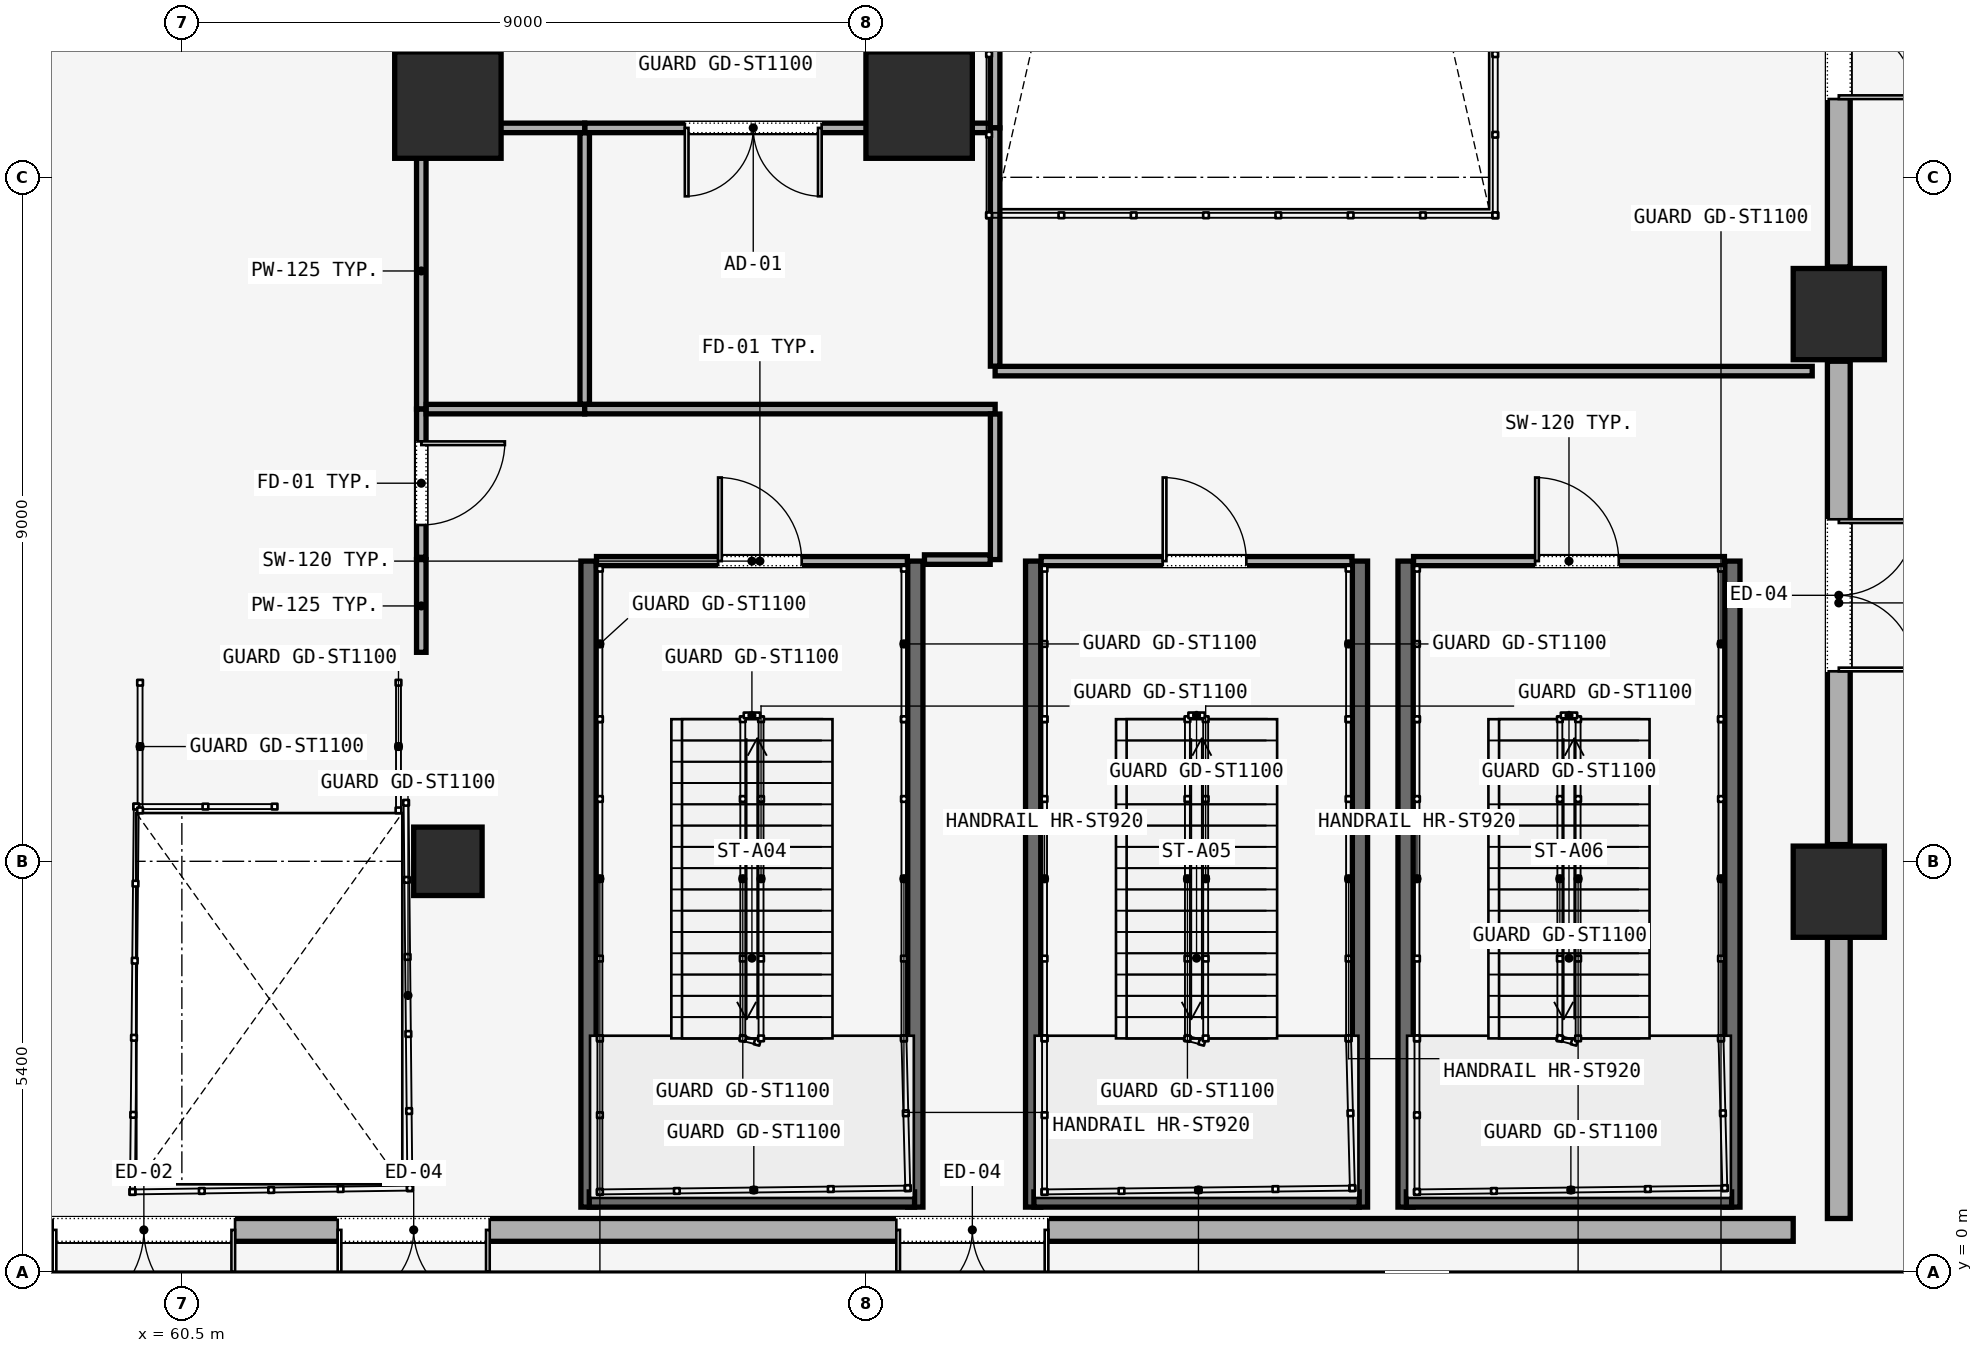
"""IFC4 building model, lengths in metres.
Left out: names, types, materials, properties, quantities, classifications, styles, units other than length and angle.
Written with IfcOpenShell. Run it as: python <this file> out.ifc"""

import sys

from ifc_helpers import new_model, si_unit, direction, frame, frame_2d, origin, origin_2d, place, context, subcontext, project, spatial, rectangle, extrude, element, fill, save


model = new_model("IFC4")
c1 = context("Model", 3, precision=1e-05, world=origin(), true_north=direction((0.0, 1.0)))
c2 = subcontext(c1, "Body", "Model", "MODEL_VIEW")
j1 = project(units=[si_unit("LENGTHUNIT", "METRE"), si_unit("PLANEANGLEUNIT", "RADIAN")], contexts=[c1])
p1 = place(None, origin())
s1 = spatial("IfcSite", under=j1, at=p1, CompositionType="ELEMENT")
p2 = place(p1, origin())
s2 = spatial("IfcBuilding", under=s1, at=p2, CompositionType="ELEMENT")
p3 = place(p2, origin())
s3 = spatial("IfcBuildingStorey", under=s2, at=p3, CompositionType="ELEMENT", Elevation=0.0)
for number, where, z_axis, x_axis in (
    (1, (82.3, 5.0, 0.0), (0.0, 0.0, 1.0), (1.0, 0.0, 0.0)),
    (2, (82.3, 12.6, 0.0), (0.0, 0.0, 1.0), (1.0, 0.0, 0.0)),
):
    element("IfcColumn", number, at=place(p3, frame(where, z_axis=z_axis, x_axis=x_axis)), inside=s3, PredefinedType="COLUMN", context=c2, shape_type="SweptSolid", body=[
        extrude(rectangle(XDim=1.2, YDim=1.2, at=origin_2d()), origin(), (0.0, 0.0, 1.0), 5.7),
    ])
for number, where, z_axis, x_axis in (
    (3, (70.2, 15.35, 0.0), (0.0, 0.0, 1.0), (1.0, 0.0, 0.0)),
    (4, (64.0, 15.35, 0.0), (0.0, 0.0, 1.0), (1.0, 0.0, 0.0)),
):
    element("IfcColumn", number, at=place(p3, frame(where, z_axis=z_axis, x_axis=x_axis)), inside=s3, PredefinedType="COLUMN", context=c2, shape_type="SweptSolid", body=[
        extrude(rectangle(XDim=1.4, YDim=1.4, at=origin_2d()), origin(), (0.0, 0.0, 1.0), 5.7),
    ])
p4 = place(p3, frame((64.0, 5.4, 0.0), z_axis=(0.0, 0.0, 1.0), x_axis=(1.0, 0.0, 0.0)))
e5 = element("IfcColumn", 5, at=p4, inside=s3, PredefinedType="COLUMN", context=c2, shape_type="SweptSolid", body=[
    extrude(rectangle(XDim=0.9, YDim=0.9, at=origin_2d()), origin(), (0.0, 0.0, 1.0), 5.7),
])
p5 = place(p3, frame((81.7, 0.55, 0.0), z_axis=(0.0, 0.0, 1.0), x_axis=(-1.0, 0.0, 0.0)))
e6 = element("IfcWall", 6, at=p5, inside=s3, PredefinedType="SOLIDWALL", context=c2, shape_type="SweptSolid", body=[
    extrude(rectangle(XDim=23.75, YDim=0.3, at=frame_2d((11.875, 0.0))), origin(), (0.0, 0.0, 1.0), 5.7),
])
p6 = place(p5, frame((20.5, 0.0, 0.0)))
e7 = element("IfcOpeningElement", 7, at=p6, cuts=e6, PredefinedType="OPENING", context=c2, shape_type="SweptSolid", body=[
    extrude(rectangle(XDim=2.4, YDim=2.5, at=frame_2d((1.2, 1.25))), frame((0.0, 0.15, 0.0), z_axis=(0.0, -1.0, 0.0), x_axis=(1.0, 0.0, 0.0)), (0.0, 0.0, 1.0), 0.3),
])
p7 = place(p5, frame((17.15, 0.0, 0.0)))
e8 = element("IfcOpeningElement", 8, at=p7, cuts=e6, PredefinedType="OPENING", context=c2, shape_type="SweptSolid", body=[
    extrude(rectangle(XDim=2.0, YDim=2.3, at=frame_2d((1.0, 1.15))), frame((0.0, 0.15, 0.0), z_axis=(0.0, -1.0, 0.0), x_axis=(1.0, 0.0, 0.0)), (0.0, 0.0, 1.0), 0.3),
])
p8 = place(p5, frame((9.8, 0.0, 0.0)))
e9 = element("IfcOpeningElement", 9, at=p8, cuts=e6, PredefinedType="OPENING", context=c2, shape_type="SweptSolid", body=[
    extrude(rectangle(XDim=2.0, YDim=2.3, at=frame_2d((1.0, 1.15))), frame((0.0, 0.15, 0.0), z_axis=(0.0, -1.0, 0.0), x_axis=(1.0, 0.0, 0.0)), (0.0, 0.0, 1.0), 0.3),
])
p9 = place(p3, frame((82.3, 4.4, 0.0), z_axis=(0.0, 0.0, 1.0), x_axis=(0.0, -1.0, 0.0)))
e10 = element("IfcWall", 10, at=p9, inside=s3, PredefinedType="SOLIDWALL", context=c2, shape_type="SweptSolid", body=[
    extrude(rectangle(XDim=3.7, YDim=0.3, at=frame_2d((1.85, 0.0))), origin(), (0.0, 0.0, 1.0), 5.7),
])
p10 = place(p3, frame((82.3, 11.98, 0.0), z_axis=(0.0, 0.0, 1.0), x_axis=(0.0, -1.0, 0.0)))
e11 = element("IfcWall", 11, at=p10, inside=s3, PredefinedType="SOLIDWALL", context=c2, shape_type="SweptSolid", body=[
    extrude(rectangle(XDim=6.36, YDim=0.3, at=frame_2d((3.18, 0.0))), origin(), (0.0, 0.0, 1.0), 5.7),
])
p11 = place(p10, frame((2.08, 0.0, 0.0)))
e12 = element("IfcOpeningElement", 12, at=p11, cuts=e11, PredefinedType="OPENING", context=c2, shape_type="SweptSolid", body=[
    extrude(rectangle(XDim=2.0, YDim=2.3, at=frame_2d((1.0, 1.15))), frame((0.0, 0.15, 0.0), z_axis=(0.0, -1.0, 0.0), x_axis=(1.0, 0.0, 0.0)), (0.0, 0.0, 1.0), 0.3),
])
p12 = place(p3, frame((82.3, 19.58, 0.0), z_axis=(0.0, 0.0, 1.0), x_axis=(0.0, -1.0, 0.0)))
e13 = element("IfcWall", 13, at=p12, inside=s3, PredefinedType="SOLIDWALL", context=c2, shape_type="SweptSolid", body=[
    extrude(rectangle(XDim=6.36, YDim=0.3, at=frame_2d((3.18, 0.0))), origin(), (0.0, 0.0, 1.0), 5.7),
])
p13 = place(p12, frame((2.15, 0.0, 0.0)))
e14 = element("IfcOpeningElement", 14, at=p13, cuts=e13, PredefinedType="OPENING", context=c2, shape_type="SweptSolid", body=[
    extrude(rectangle(XDim=2.0, YDim=2.3, at=frame_2d((1.0, 1.15))), frame((0.0, 0.15, 0.0), z_axis=(0.0, -1.0, 0.0), x_axis=(1.0, 0.0, 0.0)), (0.0, 0.0, 1.0), 0.3),
])
for number, where, z_axis, x_axis in (
    (15, (65.85, 9.35, -0.4), (0.0, 0.0, 1.0), (0.0, -1.0, 0.0)),
    (16, (70.15, 9.35, -0.4), (0.0, 0.0, 1.0), (0.0, -1.0, 0.0)),
):
    element("IfcWall", number, at=place(p3, frame(where, z_axis=z_axis, x_axis=x_axis)), inside=s3, PredefinedType="SOLIDWALL", context=c2, shape_type="SweptSolid", body=[
        extrude(rectangle(XDim=8.5, YDim=0.2, at=frame_2d((4.25, 0.0))), origin(), (0.0, 0.0, 1.0), 6.4),
    ])
p14 = place(p3, frame((65.86, 0.95, -0.4), z_axis=(0.0, 0.0, 1.0), x_axis=(1.0, 0.0, 0.0)))
e17 = element("IfcWall", 17, at=p14, inside=s3, PredefinedType="SOLIDWALL", context=c2, shape_type="SweptSolid", body=[
    extrude(rectangle(XDim=4.28, YDim=0.2, at=frame_2d((2.14, 0.0))), origin(), (0.0, 0.0, 1.0), 6.4),
])
p15 = place(p3, frame((65.955, 9.35, 0.0), z_axis=(0.0, 0.0, 1.0), x_axis=(1.0, 0.0, 0.0)))
e18 = element("IfcWall", 18, at=p15, inside=s3, PredefinedType="SOLIDWALL", context=c2, shape_type="SweptSolid", body=[
    extrude(rectangle(XDim=4.09, YDim=0.12, at=frame_2d((2.045, 0.0))), origin(), (0.0, 0.0, 1.0), 3.6),
])
p16 = place(p15, frame((1.6, 0.0, 0.0)))
e19 = element("IfcOpeningElement", 19, at=p16, cuts=e18, PredefinedType="OPENING", context=c2, shape_type="SweptSolid", body=[
    extrude(rectangle(XDim=1.1, YDim=2.2, at=frame_2d((0.55, 1.1))), frame((0.0, 0.06, 0.0), z_axis=(0.0, -1.0, 0.0), x_axis=(1.0, 0.0, 0.0)), (0.0, 0.0, 1.0), 0.12),
])
for number, where, z_axis, x_axis in (
    (20, (71.7, 9.35, -0.4), (0.0, 0.0, 1.0), (0.0, -1.0, 0.0)),
    (21, (76.0, 9.35, -0.4), (0.0, 0.0, 1.0), (0.0, -1.0, 0.0)),
):
    element("IfcWall", number, at=place(p3, frame(where, z_axis=z_axis, x_axis=x_axis)), inside=s3, PredefinedType="SOLIDWALL", context=c2, shape_type="SweptSolid", body=[
        extrude(rectangle(XDim=8.5, YDim=0.2, at=frame_2d((4.25, 0.0))), origin(), (0.0, 0.0, 1.0), 6.4),
    ])
p17 = place(p3, frame((71.71, 0.95, -0.4), z_axis=(0.0, 0.0, 1.0), x_axis=(1.0, 0.0, 0.0)))
e22 = element("IfcWall", 22, at=p17, inside=s3, PredefinedType="SOLIDWALL", context=c2, shape_type="SweptSolid", body=[
    extrude(rectangle(XDim=4.28, YDim=0.2, at=frame_2d((2.14, 0.0))), origin(), (0.0, 0.0, 1.0), 6.4),
])
p18 = place(p3, frame((71.805, 9.35, 0.0), z_axis=(0.0, 0.0, 1.0), x_axis=(1.0, 0.0, 0.0)))
e23 = element("IfcWall", 23, at=p18, inside=s3, PredefinedType="SOLIDWALL", context=c2, shape_type="SweptSolid", body=[
    extrude(rectangle(XDim=4.09, YDim=0.12, at=frame_2d((2.045, 0.0))), origin(), (0.0, 0.0, 1.0), 3.6),
])
p19 = place(p18, frame((1.6, 0.0, 0.0)))
e24 = element("IfcOpeningElement", 24, at=p19, cuts=e23, PredefinedType="OPENING", context=c2, shape_type="SweptSolid", body=[
    extrude(rectangle(XDim=1.1, YDim=2.2, at=frame_2d((0.55, 1.1))), frame((0.0, 0.06, 0.0), z_axis=(0.0, -1.0, 0.0), x_axis=(1.0, 0.0, 0.0)), (0.0, 0.0, 1.0), 0.12),
])
for number, where, z_axis, x_axis in (
    (25, (76.6, 9.35, -0.4), (0.0, 0.0, 1.0), (0.0, -1.0, 0.0)),
    (26, (80.9, 9.35, -0.4), (0.0, 0.0, 1.0), (0.0, -1.0, 0.0)),
):
    element("IfcWall", number, at=place(p3, frame(where, z_axis=z_axis, x_axis=x_axis)), inside=s3, PredefinedType="SOLIDWALL", context=c2, shape_type="SweptSolid", body=[
        extrude(rectangle(XDim=8.5, YDim=0.2, at=frame_2d((4.25, 0.0))), origin(), (0.0, 0.0, 1.0), 6.4),
    ])
p20 = place(p3, frame((76.61, 0.95, -0.4), z_axis=(0.0, 0.0, 1.0), x_axis=(1.0, 0.0, 0.0)))
e27 = element("IfcWall", 27, at=p20, inside=s3, PredefinedType="SOLIDWALL", context=c2, shape_type="SweptSolid", body=[
    extrude(rectangle(XDim=4.28, YDim=0.2, at=frame_2d((2.14, 0.0))), origin(), (0.0, 0.0, 1.0), 6.4),
])
p21 = place(p3, frame((76.705, 9.35, 0.0), z_axis=(0.0, 0.0, 1.0), x_axis=(1.0, 0.0, 0.0)))
e28 = element("IfcWall", 28, at=p21, inside=s3, PredefinedType="SOLIDWALL", context=c2, shape_type="SweptSolid", body=[
    extrude(rectangle(XDim=4.09, YDim=0.12, at=frame_2d((2.045, 0.0))), origin(), (0.0, 0.0, 1.0), 3.6),
])
p22 = place(p21, frame((1.6, 0.0, 0.0)))
e29 = element("IfcOpeningElement", 29, at=p22, cuts=e28, PredefinedType="OPENING", context=c2, shape_type="SweptSolid", body=[
    extrude(rectangle(XDim=1.1, YDim=2.2, at=frame_2d((0.55, 1.1))), frame((0.0, 0.06, 0.0), z_axis=(0.0, -1.0, 0.0), x_axis=(1.0, 0.0, 0.0)), (0.0, 0.0, 1.0), 0.12),
])
p23 = place(p3, frame((71.2, 16.885, 0.0), z_axis=(0.0, 0.0, 1.0), x_axis=(0.0, -1.0, 0.0)))
e30 = element("IfcWall", 30, at=p23, inside=s3, PredefinedType="PARTITIONING", context=c2, shape_type="SweptSolid", body=[
    extrude(rectangle(XDim=1.835, YDim=0.125, at=frame_2d((0.917, 0.0))), origin(), (0.0, 0.0, 1.0), 3.6),
])
p24 = place(p3, frame((71.135, 15.05, 0.0), z_axis=(0.0, 0.0, 1.0), x_axis=(-1.0, 0.0, 0.0)))
e31 = element("IfcWall", 31, at=p24, inside=s3, PredefinedType="PARTITIONING", context=c2, shape_type="SweptSolid", body=[
    extrude(rectangle(XDim=5.335, YDim=0.125, at=frame_2d((2.667, 0.0))), origin(), (0.0, 0.0, 1.0), 3.6),
])
p25 = place(p24, frame((2.218, 0.0, 0.0)))
e32 = element("IfcOpeningElement", 32, at=p25, cuts=e31, PredefinedType="OPENING", context=c2, shape_type="SweptSolid", body=[
    extrude(rectangle(XDim=1.8, YDim=2.3, at=frame_2d((0.9, 1.15))), frame((0.0, 0.062, 0.0), z_axis=(0.0, -1.0, 0.0), x_axis=(1.0, 0.0, 0.0)), (0.0, 0.0, 1.0), 0.125),
])
p26 = place(p3, frame((65.8, 15.05, 0.0), z_axis=(0.0, 0.0, 1.0), x_axis=(-1.0, 0.0, 0.0)))
e33 = element("IfcWall", 33, at=p26, inside=s3, PredefinedType="PARTITIONING", context=c2, shape_type="SweptSolid", body=[
    extrude(rectangle(XDim=2.15, YDim=0.125, at=frame_2d((1.075, 0.0))), origin(), (0.0, 0.0, 1.0), 3.6),
])
p27 = place(p3, frame((63.65, 14.985, 0.0), z_axis=(0.0, 0.0, 1.0), x_axis=(0.0, -1.0, 0.0)))
e34 = element("IfcWall", 34, at=p27, inside=s3, PredefinedType="PARTITIONING", context=c2, shape_type="SweptSolid", body=[
    extrude(rectangle(XDim=3.635, YDim=0.125, at=frame_2d((1.817, 0.0))), origin(), (0.0, 0.0, 1.0), 3.6),
])
p28 = place(p3, frame((63.65, 11.35, 0.0), z_axis=(0.0, 0.0, 1.0), x_axis=(0.0, -1.0, 0.0)))
e35 = element("IfcWall", 35, at=p28, inside=s3, PredefinedType="PARTITIONING", context=c2, shape_type="SweptSolid", body=[
    extrude(rectangle(XDim=1.95, YDim=0.125, at=frame_2d((0.975, 0.0))), origin(), (0.0, 0.0, 1.0), 3.6),
])
p29 = place(p28, frame((0.425, 0.0, 0.0)))
e36 = element("IfcOpeningElement", 36, at=p29, cuts=e35, PredefinedType="OPENING", context=c2, shape_type="SweptSolid", body=[
    extrude(rectangle(XDim=1.1, YDim=2.2, at=frame_2d((0.55, 1.1))), frame((0.0, 0.062, 0.0), z_axis=(0.0, -1.0, 0.0), x_axis=(1.0, 0.0, 0.0)), (0.0, 0.0, 1.0), 0.125),
])
p30 = place(p3, frame((63.65, 9.37, 0.0), z_axis=(0.0, 0.0, 1.0), x_axis=(0.0, -1.0, 0.0)))
e37 = element("IfcWall", 37, at=p30, inside=s3, PredefinedType="PARTITIONING", context=c2, shape_type="SweptSolid", body=[
    extrude(rectangle(XDim=1.22, YDim=0.125, at=frame_2d((0.61, 0.0))), origin(), (0.0, 0.0, 1.0), 3.6),
])
p31 = place(p3, frame((63.715, 11.35, 0.0), z_axis=(0.0, 0.0, 1.0), x_axis=(1.0, 0.0, 0.0)))
e38 = element("IfcWall", 38, at=p31, inside=s3, PredefinedType="PARTITIONING", context=c2, shape_type="SweptSolid", body=[
    extrude(rectangle(XDim=2.085, YDim=0.125, at=frame_2d((1.042, 0.0))), origin(), (0.0, 0.0, 1.0), 3.6),
])
p32 = place(p3, frame((65.8, 11.35, 0.0), z_axis=(0.0, 0.0, 1.0), x_axis=(1.0, 0.0, 0.0)))
e39 = element("IfcWall", 39, at=p32, inside=s3, PredefinedType="PARTITIONING", context=c2, shape_type="SweptSolid", body=[
    extrude(rectangle(XDim=5.4, YDim=0.125, at=frame_2d((2.7, 0.0))), origin(), (0.0, 0.0, 1.0), 3.6),
])
p33 = place(p3, frame((71.2, 11.285, 0.0), z_axis=(0.0, 0.0, 1.0), x_axis=(0.0, -1.0, 0.0)))
e40 = element("IfcWall", 40, at=p33, inside=s3, PredefinedType="PARTITIONING", context=c2, shape_type="SweptSolid", body=[
    extrude(rectangle(XDim=1.915, YDim=0.125, at=frame_2d((0.958, 0.0))), origin(), (0.0, 0.0, 1.0), 3.6),
])
p34 = place(p3, frame((71.135, 9.37, 0.0), z_axis=(0.0, 0.0, 1.0), x_axis=(-1.0, 0.0, 0.0)))
e41 = element("IfcWall", 41, at=p34, inside=s3, PredefinedType="PARTITIONING", context=c2, shape_type="SweptSolid", body=[
    extrude(rectangle(XDim=0.865, YDim=0.125, at=frame_2d((0.433, 0.0))), origin(), (0.0, 0.0, 1.0), 3.6),
])
p35 = place(p3, frame((71.2, 11.85, 0.0), z_axis=(0.0, 0.0, 1.0), x_axis=(1.0, 0.0, 0.0)))
e42 = element("IfcWall", 42, at=p35, inside=s3, PredefinedType="PARTITIONING", context=c2, shape_type="SweptSolid", body=[
    extrude(rectangle(XDim=10.75, YDim=0.125, at=frame_2d((5.375, 0.0))), origin(), (0.0, 0.0, 1.0), 3.6),
])
p36 = place(p3, frame((65.8, 11.415, 0.0), z_axis=(0.0, 0.0, 1.0), x_axis=(0.0, 1.0, 0.0)))
e43 = element("IfcWall", 43, at=p36, inside=s3, PredefinedType="PARTITIONING", context=c2, shape_type="SweptSolid", body=[
    extrude(rectangle(XDim=3.57, YDim=0.125, at=frame_2d((1.785, 0.0))), origin(), (0.0, 0.0, 1.0), 3.6),
])
p37 = place(p3, frame((71.2, 15.05, 0.0), z_axis=(0.0, 0.0, 1.0), x_axis=(0.0, -1.0, 0.0)))
e44 = element("IfcWall", 44, at=p37, inside=s3, PredefinedType="PARTITIONING", context=c2, shape_type="SweptSolid", body=[
    extrude(rectangle(XDim=3.135, YDim=0.125, at=frame_2d((1.567, 0.0))), origin(), (0.0, 0.0, 1.0), 3.6),
])
p38 = place(p6, origin())
e45 = element("IfcDoor", 45, at=p38, inside=s3, OperationType="DOUBLE_DOOR_SINGLE_SWING", PredefinedType="DOOR", context=c2, shape_type="SweptSolid", body=[
    extrude(rectangle(XDim=2.4, YDim=2.5, at=frame_2d((1.2, 1.25))), frame((0.0, 0.025, 0.0), z_axis=(0.0, -1.0, 0.0), x_axis=(1.0, 0.0, 0.0)), (0.0, 0.0, 1.0), 0.05),
])
fill(e7, e45)
p39 = place(p7, origin())
e46 = element("IfcDoor", 46, at=p39, inside=s3, OperationType="DOUBLE_DOOR_SINGLE_SWING", PredefinedType="DOOR", context=c2, shape_type="SweptSolid", body=[
    extrude(rectangle(XDim=2.0, YDim=2.3, at=frame_2d((1.0, 1.15))), frame((0.0, 0.025, 0.0), z_axis=(0.0, -1.0, 0.0), x_axis=(1.0, 0.0, 0.0)), (0.0, 0.0, 1.0), 0.05),
])
fill(e8, e46)
p40 = place(p8, origin())
e47 = element("IfcDoor", 47, at=p40, inside=s3, OperationType="DOUBLE_DOOR_SINGLE_SWING", PredefinedType="DOOR", context=c2, shape_type="SweptSolid", body=[
    extrude(rectangle(XDim=2.0, YDim=2.3, at=frame_2d((1.0, 1.15))), frame((0.0, 0.025, 0.0), z_axis=(0.0, -1.0, 0.0), x_axis=(1.0, 0.0, 0.0)), (0.0, 0.0, 1.0), 0.05),
])
fill(e9, e47)
p41 = place(p11, origin())
e48 = element("IfcDoor", 48, at=p41, inside=s3, OperationType="DOUBLE_DOOR_SINGLE_SWING", PredefinedType="DOOR", context=c2, shape_type="SweptSolid", body=[
    extrude(rectangle(XDim=2.0, YDim=2.3, at=frame_2d((1.0, 1.15))), frame((0.0, 0.025, 0.0), z_axis=(0.0, -1.0, 0.0), x_axis=(1.0, 0.0, 0.0)), (0.0, 0.0, 1.0), 0.05),
])
fill(e12, e48)
p42 = place(p13, origin())
e49 = element("IfcDoor", 49, at=p42, inside=s3, OperationType="DOUBLE_DOOR_SINGLE_SWING", PredefinedType="DOOR", context=c2, shape_type="SweptSolid", body=[
    extrude(rectangle(XDim=2.0, YDim=2.3, at=frame_2d((1.0, 1.15))), frame((0.0, 0.025, 0.0), z_axis=(0.0, -1.0, 0.0), x_axis=(1.0, 0.0, 0.0)), (0.0, 0.0, 1.0), 0.05),
])
fill(e14, e49)
p43 = place(p16, origin())
e50 = element("IfcDoor", 50, at=p43, inside=s3, OperationType="SINGLE_SWING_LEFT", PredefinedType="DOOR", context=c2, shape_type="SweptSolid", body=[
    extrude(rectangle(XDim=1.1, YDim=2.2, at=frame_2d((0.55, 1.1))), frame((0.0, 0.025, 0.0), z_axis=(0.0, -1.0, 0.0), x_axis=(1.0, 0.0, 0.0)), (0.0, 0.0, 1.0), 0.05),
])
fill(e19, e50)
p44 = place(p19, origin())
e51 = element("IfcDoor", 51, at=p44, inside=s3, OperationType="SINGLE_SWING_LEFT", PredefinedType="DOOR", context=c2, shape_type="SweptSolid", body=[
    extrude(rectangle(XDim=1.1, YDim=2.2, at=frame_2d((0.55, 1.1))), frame((0.0, 0.025, 0.0), z_axis=(0.0, -1.0, 0.0), x_axis=(1.0, 0.0, 0.0)), (0.0, 0.0, 1.0), 0.05),
])
fill(e24, e51)
p45 = place(p22, origin())
e52 = element("IfcDoor", 52, at=p45, inside=s3, OperationType="SINGLE_SWING_LEFT", PredefinedType="DOOR", context=c2, shape_type="SweptSolid", body=[
    extrude(rectangle(XDim=1.1, YDim=2.2, at=frame_2d((0.55, 1.1))), frame((0.0, 0.025, 0.0), z_axis=(0.0, -1.0, 0.0), x_axis=(1.0, 0.0, 0.0)), (0.0, 0.0, 1.0), 0.05),
])
fill(e29, e52)
p46 = place(p29, origin())
e53 = element("IfcDoor", 53, at=p46, inside=s3, OperationType="SINGLE_SWING_LEFT", PredefinedType="DOOR", context=c2, shape_type="SweptSolid", body=[
    extrude(rectangle(XDim=1.1, YDim=2.2, at=frame_2d((0.55, 1.1))), frame((0.0, 0.025, 0.0), z_axis=(0.0, -1.0, 0.0), x_axis=(1.0, 0.0, 0.0)), (0.0, 0.0, 1.0), 0.05),
])
fill(e36, e53)
p47 = place(p25, origin())
e54 = element("IfcDoor", 54, at=p47, inside=s3, OperationType="SINGLE_SWING_LEFT", PredefinedType="DOOR", context=c2, shape_type="SweptSolid", body=[
    extrude(rectangle(XDim=1.8, YDim=2.3, at=frame_2d((0.9, 1.15))), frame((0.0, 0.025, 0.0), z_axis=(0.0, -1.0, 0.0), x_axis=(1.0, 0.0, 0.0)), (0.0, 0.0, 1.0), 0.05),
])
fill(e32, e54)
save(model, sys.argv[1])
